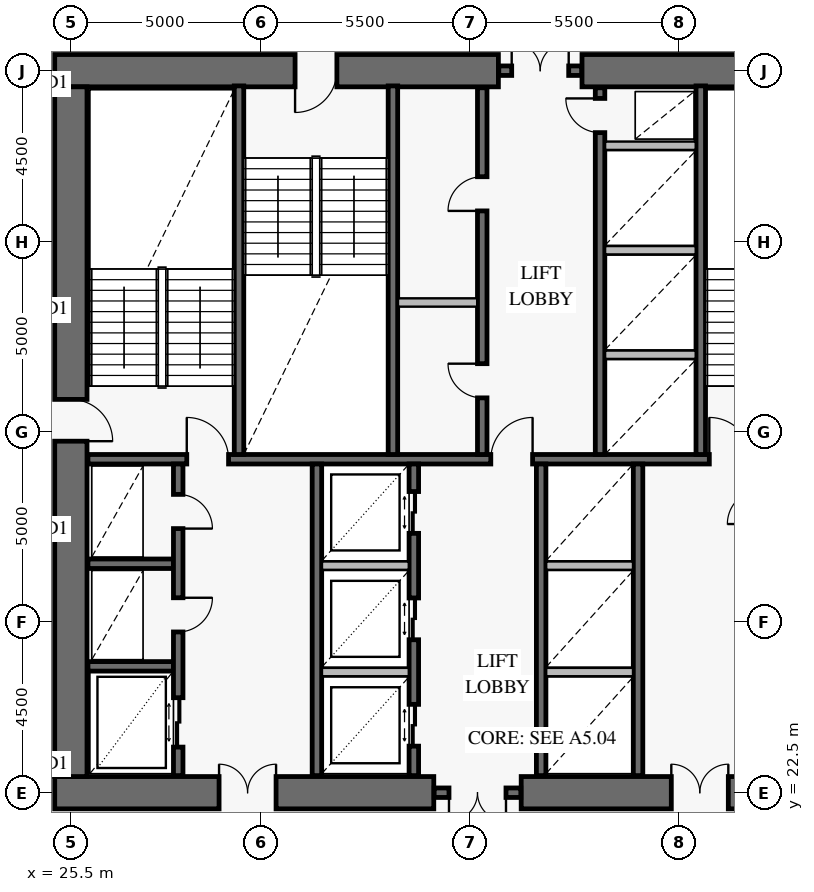
"""IFC4 building model, lengths in metres.
Left out: names, types, materials, properties, quantities, classifications, styles, units other than length and angle.
Written with IfcOpenShell. Run it as: python <this file> out.ifc"""

import sys

from ifc_helpers import new_model, si_unit, direction, frame, frame_2d, origin, place, context, subcontext, project, spatial, rectangle, extrude, element, fill, save


model = new_model("IFC4")
c1 = context("Model", 3, precision=1e-05, world=origin(), true_north=direction((0.0, 1.0)))
c2 = subcontext(c1, "Body", "Model", "MODEL_VIEW")
j1 = project(units=[si_unit("LENGTHUNIT", "METRE"), si_unit("PLANEANGLEUNIT", "RADIAN")], contexts=[c1])
p1 = place(None, origin())
s1 = spatial("IfcSite", under=j1, at=p1, CompositionType="ELEMENT")
p2 = place(p1, origin())
s2 = spatial("IfcBuilding", under=s1, at=p2, CompositionType="ELEMENT")
p3 = place(p2, frame((0.0, 0.0, 16.2)))
s3 = spatial("IfcBuildingStorey", under=s2, at=p3, CompositionType="ELEMENT", Elevation=16.2)
p4 = place(p3, frame((25.075, 22.5, 0.0), z_axis=(0.0, 0.0, 1.0), x_axis=(1.0, 0.0, 0.0)))
e1 = element("IfcWall", 1, at=p4, inside=s3, PredefinedType="SHEAR", context=c2, shape_type="SweptSolid", body=[
    extrude(rectangle(XDim=9.975, YDim=0.85, at=frame_2d((4.988, 0.0))), origin(), (0.0, 0.0, 1.0), 4.2),
])
p5 = place(p4, frame((4.325, 0.0, 0.0)))
e2 = element("IfcOpeningElement", 2, at=p5, cuts=e1, PredefinedType="OPENING", context=c2, shape_type="SweptSolid", body=[
    extrude(rectangle(XDim=1.5, YDim=2.15, at=frame_2d((0.75, 1.075))), frame((0.0, 0.437, 0.0), z_axis=(0.0, -1.0, 0.0), x_axis=(1.0, 0.0, 0.0)), (0.0, 0.0, 1.0), 0.874),
])
p6 = place(p3, frame((37.35, 22.5, 0.0), z_axis=(0.0, 0.0, 1.0), x_axis=(1.0, 0.0, 0.0)))
e3 = element("IfcWall", 3, at=p6, inside=s3, PredefinedType="SHEAR", context=c2, shape_type="SweptSolid", body=[
    extrude(rectangle(XDim=9.575, YDim=0.85, at=frame_2d((4.788, 0.0))), origin(), (0.0, 0.0, 1.0), 4.2),
])
p7 = place(p6, frame((3.95, 0.0, 0.0)))
e4 = element("IfcOpeningElement", 4, at=p7, cuts=e3, PredefinedType="OPENING", context=c2, shape_type="SweptSolid", body=[
    extrude(rectangle(XDim=1.5, YDim=2.15, at=frame_2d((0.75, 1.075))), frame((0.0, 0.437, 0.0), z_axis=(0.0, -1.0, 0.0), x_axis=(1.0, 0.0, 0.0)), (0.0, 0.0, 1.0), 0.874),
])
p8 = place(p3, frame((46.925, 41.5, 0.0), z_axis=(0.0, 0.0, 1.0), x_axis=(-1.0, 0.0, 0.0)))
e5 = element("IfcWall", 5, at=p8, inside=s3, PredefinedType="SHEAR", context=c2, shape_type="SweptSolid", body=[
    extrude(rectangle(XDim=7.975, YDim=0.85, at=frame_2d((3.988, 0.0))), origin(), (0.0, 0.0, 1.0), 4.2),
])
p9 = place(p3, frame((36.75, 41.5, 0.0), z_axis=(0.0, 0.0, 1.0), x_axis=(-1.0, 0.0, 0.0)))
e6 = element("IfcWall", 6, at=p9, inside=s3, PredefinedType="SHEAR", context=c2, shape_type="SweptSolid", body=[
    extrude(rectangle(XDim=11.675, YDim=0.85, at=frame_2d((5.837, 0.0))), origin(), (0.0, 0.0, 1.0), 4.2),
])
p10 = place(p9, frame((4.25, 0.0, 0.0)))
e7 = element("IfcOpeningElement", 7, at=p10, cuts=e6, PredefinedType="OPENING", context=c2, shape_type="SweptSolid", body=[
    extrude(rectangle(XDim=1.1, YDim=2.15, at=frame_2d((0.55, 1.075))), frame((0.0, 0.437, 0.0), z_axis=(0.0, -1.0, 0.0), x_axis=(1.0, 0.0, 0.0)), (0.0, 0.0, 1.0), 0.874),
])
p11 = place(p3, frame((25.5, 22.925, 0.0), z_axis=(0.0, 0.0, 1.0), x_axis=(0.0, 1.0, 0.0)))
e8 = element("IfcWall", 8, at=p11, inside=s3, PredefinedType="SHEAR", context=c2, shape_type="SweptSolid", body=[
    extrude(rectangle(XDim=18.15, YDim=0.85, at=frame_2d((9.075, 0.0))), origin(), (0.0, 0.0, 1.0), 4.2),
])
p12 = place(p11, frame((8.825, 0.0, 0.0)))
e9 = element("IfcOpeningElement", 9, at=p12, cuts=e8, PredefinedType="OPENING", context=c2, shape_type="SweptSolid", body=[
    extrude(rectangle(XDim=1.1, YDim=2.15, at=frame_2d((0.55, 1.075))), frame((0.0, 0.437, 0.0), z_axis=(0.0, -1.0, 0.0), x_axis=(1.0, 0.0, 0.0)), (0.0, 0.0, 1.0), 0.874),
])
p13 = place(p3, frame((35.06, 22.5, 0.0), z_axis=(0.0, 0.0, 1.0), x_axis=(1.0, 0.0, 0.0)))
e10 = element("IfcWall", 10, at=p13, inside=s3, PredefinedType="SOLIDWALL", context=c2, shape_type="SweptSolid", body=[
    extrude(rectangle(XDim=2.28, YDim=0.25, at=frame_2d((1.14, 0.0))), origin(), (0.0, 0.0, 1.0), 4.2),
])
p14 = place(p13, frame((0.39, 0.0, 0.0)))
e11 = element("IfcOpeningElement", 11, at=p14, cuts=e10, PredefinedType="OPENING", context=c2, shape_type="SweptSolid", body=[
    extrude(rectangle(XDim=1.5, YDim=2.15, at=frame_2d((0.75, 1.075))), frame((0.0, 0.137, 0.0), z_axis=(0.0, -1.0, 0.0), x_axis=(1.0, 0.0, 0.0)), (0.0, 0.0, 1.0), 0.274),
])
p15 = place(p3, frame((36.76, 41.5, 0.0), z_axis=(0.0, 0.0, 1.0), x_axis=(1.0, 0.0, 0.0)))
e12 = element("IfcWall", 12, at=p15, inside=s3, PredefinedType="SOLIDWALL", context=c2, shape_type="SweptSolid", body=[
    extrude(rectangle(XDim=2.18, YDim=0.25, at=frame_2d((1.09, 0.0))), origin(), (0.0, 0.0, 1.0), 4.2),
])
p16 = place(p15, frame((0.34, 0.0, 0.0)))
e13 = element("IfcOpeningElement", 13, at=p16, cuts=e12, PredefinedType="OPENING", context=c2, shape_type="SweptSolid", body=[
    extrude(rectangle(XDim=1.5, YDim=2.15, at=frame_2d((0.75, 1.075))), frame((0.0, 0.137, 0.0), z_axis=(0.0, -1.0, 0.0), x_axis=(1.0, 0.0, 0.0)), (0.0, 0.0, 1.0), 0.274),
])
p17 = place(p3, frame((25.95, 31.275, 0.0), z_axis=(0.0, 0.0, 1.0), x_axis=(1.0, 0.0, 0.0)))
e14 = element("IfcWall", 14, at=p17, inside=s3, PredefinedType="SOLIDWALL", context=c2, shape_type="SweptSolid", body=[
    extrude(rectangle(XDim=20.1, YDim=0.25, at=frame_2d((10.05, 0.0))), origin(), (0.0, 0.0, 1.0), 4.2),
])
p18 = place(p17, frame((2.6, 0.0, 0.0)))
e15 = element("IfcOpeningElement", 15, at=p18, cuts=e14, PredefinedType="OPENING", context=c2, shape_type="SweptSolid", body=[
    extrude(rectangle(XDim=1.1, YDim=2.15, at=frame_2d((0.55, 1.075))), frame((0.0, 0.137, 0.0), z_axis=(0.0, -1.0, 0.0), x_axis=(1.0, 0.0, 0.0)), (0.0, 0.0, 1.0), 0.274),
])
p19 = place(p17, frame((10.6, 0.0, 0.0)))
e16 = element("IfcOpeningElement", 16, at=p19, cuts=e14, PredefinedType="OPENING", context=c2, shape_type="SweptSolid", body=[
    extrude(rectangle(XDim=1.1, YDim=2.15, at=frame_2d((0.55, 1.075))), frame((0.0, 0.137, 0.0), z_axis=(0.0, -1.0, 0.0), x_axis=(1.0, 0.0, 0.0)), (0.0, 0.0, 1.0), 0.274),
])
p20 = place(p17, frame((16.35, 0.0, 0.0)))
e17 = element("IfcOpeningElement", 17, at=p20, cuts=e14, PredefinedType="OPENING", context=c2, shape_type="SweptSolid", body=[
    extrude(rectangle(XDim=1.1, YDim=2.15, at=frame_2d((0.55, 1.075))), frame((0.0, 0.137, 0.0), z_axis=(0.0, -1.0, 0.0), x_axis=(1.0, 0.0, 0.0)), (0.0, 0.0, 1.0), 0.274),
])
for number, where, z_axis, x_axis in (
    (18, (29.925, 31.4, 0.0), (0.0, 0.0, 1.0), (0.0, 1.0, 0.0)),
    (19, (33.975, 31.4, 0.0), (0.0, 0.0, 1.0), (0.0, 1.0, 0.0)),
    (20, (42.075, 31.4, 0.0), (0.0, 0.0, 1.0), (0.0, 1.0, 0.0)),
):
    element("IfcWall", number, at=place(p3, frame(where, z_axis=z_axis, x_axis=x_axis)), inside=s3, PredefinedType="SOLIDWALL", context=c2, shape_type="SweptSolid", body=[
        extrude(rectangle(XDim=9.7, YDim=0.25, at=frame_2d((4.85, 0.0))), origin(), (0.0, 0.0, 1.0), 4.2),
    ])
p21 = place(p3, frame((36.325, 31.4, 0.0), z_axis=(0.0, 0.0, 1.0), x_axis=(0.0, 1.0, 0.0)))
e21 = element("IfcWall", 21, at=p21, inside=s3, PredefinedType="SOLIDWALL", context=c2, shape_type="SweptSolid", body=[
    extrude(rectangle(XDim=9.65, YDim=0.25, at=frame_2d((4.825, 0.0))), origin(), (0.0, 0.0, 1.0), 4.2),
])
p22 = place(p21, frame((1.49, 0.0, 0.0)))
e22 = element("IfcOpeningElement", 22, at=p22, cuts=e21, PredefinedType="OPENING", context=c2, shape_type="SweptSolid", body=[
    extrude(rectangle(XDim=0.9, YDim=2.1, at=frame_2d((0.45, 1.05))), frame((0.0, 0.137, 0.0), z_axis=(0.0, -1.0, 0.0), x_axis=(1.0, 0.0, 0.0)), (0.0, 0.0, 1.0), 0.274),
])
p23 = place(p21, frame((6.41, 0.0, 0.0)))
e23 = element("IfcOpeningElement", 23, at=p23, cuts=e21, PredefinedType="OPENING", context=c2, shape_type="SweptSolid", body=[
    extrude(rectangle(XDim=0.9, YDim=2.1, at=frame_2d((0.45, 1.05))), frame((0.0, 0.137, 0.0), z_axis=(0.0, -1.0, 0.0), x_axis=(1.0, 0.0, 0.0)), (0.0, 0.0, 1.0), 0.274),
])
p24 = place(p3, frame((39.425, 31.4, 0.0), z_axis=(0.0, 0.0, 1.0), x_axis=(0.0, 1.0, 0.0)))
e24 = element("IfcWall", 24, at=p24, inside=s3, PredefinedType="SOLIDWALL", context=c2, shape_type="SweptSolid", body=[
    extrude(rectangle(XDim=9.65, YDim=0.25, at=frame_2d((4.825, 0.0))), origin(), (0.0, 0.0, 1.0), 4.2),
])
p25 = place(p24, frame((8.47, 0.0, 0.0)))
e25 = element("IfcOpeningElement", 25, at=p25, cuts=e24, PredefinedType="OPENING", context=c2, shape_type="SweptSolid", body=[
    extrude(rectangle(XDim=0.9, YDim=2.1, at=frame_2d((0.45, 1.05))), frame((0.0, 0.137, 0.0), z_axis=(0.0, -1.0, 0.0), x_axis=(1.0, 0.0, 0.0)), (0.0, 0.0, 1.0), 0.274),
])
for number, where, z_axis, x_axis in (
    (26, (25.95, 25.825, 0.0), (0.0, 0.0, 1.0), (1.0, 0.0, 0.0)),
    (27, (25.95, 28.525, 0.0), (0.0, 0.0, 1.0), (1.0, 0.0, 0.0)),
):
    element("IfcWall", number, at=place(p3, frame(where, z_axis=z_axis, x_axis=x_axis)), inside=s3, PredefinedType="SOLIDWALL", context=c2, shape_type="SweptSolid", body=[
        extrude(rectangle(XDim=2.25, YDim=0.25, at=frame_2d((1.125, 0.0))), origin(), (0.0, 0.0, 1.0), 4.2),
    ])
p26 = place(p3, frame((28.325, 22.95, 0.0), z_axis=(0.0, 0.0, 1.0), x_axis=(0.0, 1.0, 0.0)))
e28 = element("IfcWall", 28, at=p26, inside=s3, PredefinedType="SOLIDWALL", context=c2, shape_type="SweptSolid", body=[
    extrude(rectangle(XDim=8.2, YDim=0.25, at=frame_2d((4.1, 0.0))), origin(), (0.0, 0.0, 1.0), 4.2),
])
p27 = place(p26, frame((0.75, 0.0, 0.0)))
e29 = element("IfcOpeningElement", 29, at=p27, cuts=e28, PredefinedType="OPENING", context=c2, shape_type="SweptSolid", body=[
    extrude(rectangle(XDim=1.3, YDim=2.3, at=frame_2d((0.65, 1.15))), frame((0.0, 0.137, 0.0), z_axis=(0.0, -1.0, 0.0), x_axis=(1.0, 0.0, 0.0)), (0.0, 0.0, 1.0), 0.274),
])
p28 = place(p26, frame((3.78, 0.0, 0.0)))
e30 = element("IfcOpeningElement", 30, at=p28, cuts=e28, PredefinedType="OPENING", context=c2, shape_type="SweptSolid", body=[
    extrude(rectangle(XDim=0.9, YDim=2.1, at=frame_2d((0.45, 1.05))), frame((0.0, 0.137, 0.0), z_axis=(0.0, -1.0, 0.0), x_axis=(1.0, 0.0, 0.0)), (0.0, 0.0, 1.0), 0.274),
])
p29 = place(p26, frame((6.5, 0.0, 0.0)))
e31 = element("IfcOpeningElement", 31, at=p29, cuts=e28, PredefinedType="OPENING", context=c2, shape_type="SweptSolid", body=[
    extrude(rectangle(XDim=0.9, YDim=2.1, at=frame_2d((0.45, 1.05))), frame((0.0, 0.137, 0.0), z_axis=(0.0, -1.0, 0.0), x_axis=(1.0, 0.0, 0.0)), (0.0, 0.0, 1.0), 0.274),
])
p30 = place(p3, frame((31.975, 22.95, 0.0), z_axis=(0.0, 0.0, 1.0), x_axis=(0.0, 1.0, 0.0)))
e32 = element("IfcWall", 32, at=p30, inside=s3, PredefinedType="SOLIDWALL", context=c2, shape_type="SweptSolid", body=[
    extrude(rectangle(XDim=8.2, YDim=0.25, at=frame_2d((4.1, 0.0))), origin(), (0.0, 0.0, 1.0), 4.2),
])
p31 = place(p3, frame((34.525, 22.95, 0.0), z_axis=(0.0, 0.0, 1.0), x_axis=(0.0, 1.0, 0.0)))
e33 = element("IfcWall", 33, at=p31, inside=s3, PredefinedType="SOLIDWALL", context=c2, shape_type="SweptSolid", body=[
    extrude(rectangle(XDim=8.2, YDim=0.25, at=frame_2d((4.1, 0.0))), origin(), (0.0, 0.0, 1.0), 4.2),
])
p32 = place(p31, frame((0.775, 0.0, 0.0)))
e34 = element("IfcOpeningElement", 34, at=p32, cuts=e33, PredefinedType="OPENING", context=c2, shape_type="SweptSolid", body=[
    extrude(rectangle(XDim=1.1, YDim=2.2, at=frame_2d((0.55, 1.1))), frame((0.0, 0.137, 0.0), z_axis=(0.0, -1.0, 0.0), x_axis=(1.0, 0.0, 0.0)), (0.0, 0.0, 1.0), 0.274),
])
p33 = place(p31, frame((3.575, 0.0, 0.0)))
e35 = element("IfcOpeningElement", 35, at=p33, cuts=e33, PredefinedType="OPENING", context=c2, shape_type="SweptSolid", body=[
    extrude(rectangle(XDim=1.1, YDim=2.2, at=frame_2d((0.55, 1.1))), frame((0.0, 0.137, 0.0), z_axis=(0.0, -1.0, 0.0), x_axis=(1.0, 0.0, 0.0)), (0.0, 0.0, 1.0), 0.274),
])
p34 = place(p31, frame((6.375, 0.0, 0.0)))
e36 = element("IfcOpeningElement", 36, at=p34, cuts=e33, PredefinedType="OPENING", context=c2, shape_type="SweptSolid", body=[
    extrude(rectangle(XDim=1.1, YDim=2.2, at=frame_2d((0.55, 1.1))), frame((0.0, 0.137, 0.0), z_axis=(0.0, -1.0, 0.0), x_axis=(1.0, 0.0, 0.0)), (0.0, 0.0, 1.0), 0.274),
])
for number, where, z_axis, x_axis in (
    (37, (37.875, 22.95, 0.0), (0.0, 0.0, 1.0), (0.0, 1.0, 0.0)),
    (38, (40.425, 22.95, 0.0), (0.0, 0.0, 1.0), (0.0, 1.0, 0.0)),
):
    element("IfcWall", number, at=place(p3, frame(where, z_axis=z_axis, x_axis=x_axis)), inside=s3, PredefinedType="SOLIDWALL", context=c2, shape_type="SweptSolid", body=[
        extrude(rectangle(XDim=8.2, YDim=0.25, at=frame_2d((4.1, 0.0))), origin(), (0.0, 0.0, 1.0), 4.2),
    ])
p35 = place(p3, frame((34.108, 35.4, 0.0), z_axis=(0.0, 0.0, 1.0), x_axis=(1.0, 0.0, 0.0)))
e39 = element("IfcWall", 39, at=p35, inside=s3, PredefinedType="PARTITIONING", context=c2, shape_type="SweptSolid", body=[
    extrude(rectangle(XDim=2.084, YDim=0.22, at=frame_2d((1.042, 0.0))), origin(), (0.0, 0.0, 1.0), 3.92),
])
for number, where, z_axis, x_axis in (
    (40, (39.558, 34.025, 0.0), (0.0, 0.0, 1.0), (1.0, 0.0, 0.0)),
    (41, (39.558, 36.775, 0.0), (0.0, 0.0, 1.0), (1.0, 0.0, 0.0)),
    (42, (39.558, 39.525, 0.0), (0.0, 0.0, 1.0), (1.0, 0.0, 0.0)),
):
    element("IfcWall", number, at=place(p3, frame(where, z_axis=z_axis, x_axis=x_axis)), inside=s3, PredefinedType="PARTITIONING", context=c2, shape_type="SweptSolid", body=[
        extrude(rectangle(XDim=2.384, YDim=0.22, at=frame_2d((1.192, 0.0))), origin(), (0.0, 0.0, 1.0), 3.92),
    ])
for number, where, z_axis, x_axis in (
    (43, (32.108, 25.675, 0.0), (0.0, 0.0, 1.0), (1.0, 0.0, 0.0)),
    (44, (32.108, 28.475, 0.0), (0.0, 0.0, 1.0), (1.0, 0.0, 0.0)),
):
    element("IfcWall", number, at=place(p3, frame(where, z_axis=z_axis, x_axis=x_axis)), inside=s3, PredefinedType="PARTITIONING", context=c2, shape_type="SweptSolid", body=[
        extrude(rectangle(XDim=2.284, YDim=0.22, at=frame_2d((1.142, 0.0))), origin(), (0.0, 0.0, 1.0), 3.92),
    ])
for number, where, z_axis, x_axis in (
    (45, (38.008, 25.675, 0.0), (0.0, 0.0, 1.0), (1.0, 0.0, 0.0)),
    (46, (38.008, 28.475, 0.0), (0.0, 0.0, 1.0), (1.0, 0.0, 0.0)),
):
    element("IfcWall", number, at=place(p3, frame(where, z_axis=z_axis, x_axis=x_axis)), inside=s3, PredefinedType="PARTITIONING", context=c2, shape_type="SweptSolid", body=[
        extrude(rectangle(XDim=2.284, YDim=0.22, at=frame_2d((1.142, 0.0))), origin(), (0.0, 0.0, 1.0), 3.92),
    ])
p36 = place(p12, frame((1.1, 0.0, 0.0), z_axis=(0.0, 0.0, 1.0), x_axis=(-1.0, 0.0, 0.0)))
e47 = element("IfcDoor", 47, at=p36, inside=s3, OperationType="SINGLE_SWING_RIGHT", PredefinedType="USERDEFINED", context=c2, shape_type="SweptSolid", body=[
    extrude(rectangle(XDim=1.1, YDim=2.15, at=frame_2d((0.55, 1.075))), frame((0.0, 0.025, 0.0), z_axis=(0.0, -1.0, 0.0), x_axis=(1.0, 0.0, 0.0)), (0.0, 0.0, 1.0), 0.05),
])
fill(e9, e47)
p37 = place(p10, origin())
e48 = element("IfcDoor", 48, at=p37, inside=s3, OperationType="SINGLE_SWING_RIGHT", PredefinedType="USERDEFINED", context=c2, shape_type="SweptSolid", body=[
    extrude(rectangle(XDim=1.1, YDim=2.15, at=frame_2d((0.55, 1.075))), frame((0.0, 0.025, 0.0), z_axis=(0.0, -1.0, 0.0), x_axis=(1.0, 0.0, 0.0)), (0.0, 0.0, 1.0), 0.05),
])
fill(e7, e48)
p38 = place(p5, origin())
e49 = element("IfcDoor", 49, at=p38, inside=s3, OperationType="DOUBLE_DOOR_SINGLE_SWING", PredefinedType="DOOR", context=c2, shape_type="SweptSolid", body=[
    extrude(rectangle(XDim=1.5, YDim=2.15, at=frame_2d((0.75, 1.075))), frame((0.0, 0.025, 0.0), z_axis=(0.0, -1.0, 0.0), x_axis=(1.0, 0.0, 0.0)), (0.0, 0.0, 1.0), 0.05),
])
fill(e2, e49)
p39 = place(p7, origin())
e50 = element("IfcDoor", 50, at=p39, inside=s3, OperationType="DOUBLE_DOOR_SINGLE_SWING", PredefinedType="DOOR", context=c2, shape_type="SweptSolid", body=[
    extrude(rectangle(XDim=1.5, YDim=2.15, at=frame_2d((0.75, 1.075))), frame((0.0, 0.025, 0.0), z_axis=(0.0, -1.0, 0.0), x_axis=(1.0, 0.0, 0.0)), (0.0, 0.0, 1.0), 0.05),
])
fill(e4, e50)
p40 = place(p14, frame((1.5, 0.0, 0.0), z_axis=(0.0, 0.0, 1.0), x_axis=(-1.0, 0.0, 0.0)))
e51 = element("IfcDoor", 51, at=p40, inside=s3, OperationType="DOUBLE_DOOR_SINGLE_SWING", PredefinedType="DOOR", context=c2, shape_type="SweptSolid", body=[
    extrude(rectangle(XDim=1.5, YDim=2.15, at=frame_2d((0.75, 1.075))), frame((0.0, 0.025, 0.0), z_axis=(0.0, -1.0, 0.0), x_axis=(1.0, 0.0, 0.0)), (0.0, 0.0, 1.0), 0.05),
])
fill(e11, e51)
p41 = place(p16, origin())
e52 = element("IfcDoor", 52, at=p41, inside=s3, OperationType="DOUBLE_DOOR_SINGLE_SWING", PredefinedType="DOOR", context=c2, shape_type="SweptSolid", body=[
    extrude(rectangle(XDim=1.5, YDim=2.15, at=frame_2d((0.75, 1.075))), frame((0.0, 0.025, 0.0), z_axis=(0.0, -1.0, 0.0), x_axis=(1.0, 0.0, 0.0)), (0.0, 0.0, 1.0), 0.05),
])
fill(e13, e52)
p42 = place(p18, origin())
e53 = element("IfcDoor", 53, at=p42, inside=s3, OperationType="SINGLE_SWING_LEFT", PredefinedType="USERDEFINED", context=c2, shape_type="SweptSolid", body=[
    extrude(rectangle(XDim=1.1, YDim=2.15, at=frame_2d((0.55, 1.075))), frame((0.0, 0.025, 0.0), z_axis=(0.0, -1.0, 0.0), x_axis=(1.0, 0.0, 0.0)), (0.0, 0.0, 1.0), 0.05),
])
fill(e15, e53)
p43 = place(p19, origin())
e54 = element("IfcDoor", 54, at=p43, inside=s3, OperationType="SINGLE_SWING_RIGHT", PredefinedType="USERDEFINED", context=c2, shape_type="SweptSolid", body=[
    extrude(rectangle(XDim=1.1, YDim=2.15, at=frame_2d((0.55, 1.075))), frame((0.0, 0.025, 0.0), z_axis=(0.0, -1.0, 0.0), x_axis=(1.0, 0.0, 0.0)), (0.0, 0.0, 1.0), 0.05),
])
fill(e16, e54)
p44 = place(p20, origin())
e55 = element("IfcDoor", 55, at=p44, inside=s3, OperationType="SINGLE_SWING_LEFT", PredefinedType="USERDEFINED", context=c2, shape_type="SweptSolid", body=[
    extrude(rectangle(XDim=1.1, YDim=2.15, at=frame_2d((0.55, 1.075))), frame((0.0, 0.025, 0.0), z_axis=(0.0, -1.0, 0.0), x_axis=(1.0, 0.0, 0.0)), (0.0, 0.0, 1.0), 0.05),
])
fill(e17, e55)
p45 = place(p22, origin())
e56 = element("IfcDoor", 56, at=p45, inside=s3, OperationType="SINGLE_SWING_RIGHT", PredefinedType="DOOR", context=c2, shape_type="SweptSolid", body=[
    extrude(rectangle(XDim=0.9, YDim=2.1, at=frame_2d((0.45, 1.05))), frame((0.0, 0.025, 0.0), z_axis=(0.0, -1.0, 0.0), x_axis=(1.0, 0.0, 0.0)), (0.0, 0.0, 1.0), 0.05),
])
fill(e22, e56)
p46 = place(p23, origin())
e57 = element("IfcDoor", 57, at=p46, inside=s3, OperationType="SINGLE_SWING_LEFT", PredefinedType="DOOR", context=c2, shape_type="SweptSolid", body=[
    extrude(rectangle(XDim=0.9, YDim=2.1, at=frame_2d((0.45, 1.05))), frame((0.0, 0.025, 0.0), z_axis=(0.0, -1.0, 0.0), x_axis=(1.0, 0.0, 0.0)), (0.0, 0.0, 1.0), 0.05),
])
fill(e23, e57)
p47 = place(p25, origin())
e58 = element("IfcDoor", 58, at=p47, inside=s3, OperationType="SINGLE_SWING_RIGHT", PredefinedType="DOOR", context=c2, shape_type="SweptSolid", body=[
    extrude(rectangle(XDim=0.9, YDim=2.1, at=frame_2d((0.45, 1.05))), frame((0.0, 0.025, 0.0), z_axis=(0.0, -1.0, 0.0), x_axis=(1.0, 0.0, 0.0)), (0.0, 0.0, 1.0), 0.05),
])
fill(e25, e58)
p48 = place(p27, frame((1.3, 0.0, 0.0), z_axis=(0.0, 0.0, 1.0), x_axis=(-1.0, 0.0, 0.0)))
e59 = element("IfcDoor", 59, at=p48, inside=s3, OperationType="DOUBLE_DOOR_SLIDING", PredefinedType="DOOR", context=c2, shape_type="SweptSolid", body=[
    extrude(rectangle(XDim=1.3, YDim=2.3, at=frame_2d((0.65, 1.15))), frame((0.0, 0.025, 0.0), z_axis=(0.0, -1.0, 0.0), x_axis=(1.0, 0.0, 0.0)), (0.0, 0.0, 1.0), 0.05),
])
fill(e29, e59)
p49 = place(p28, frame((0.9, 0.0, 0.0), z_axis=(0.0, 0.0, 1.0), x_axis=(-1.0, 0.0, 0.0)))
e60 = element("IfcDoor", 60, at=p49, inside=s3, OperationType="SINGLE_SWING_LEFT", PredefinedType="DOOR", context=c2, shape_type="SweptSolid", body=[
    extrude(rectangle(XDim=0.9, YDim=2.1, at=frame_2d((0.45, 1.05))), frame((0.0, 0.025, 0.0), z_axis=(0.0, -1.0, 0.0), x_axis=(1.0, 0.0, 0.0)), (0.0, 0.0, 1.0), 0.05),
])
fill(e30, e60)
p50 = place(p29, frame((0.9, 0.0, 0.0), z_axis=(0.0, 0.0, 1.0), x_axis=(-1.0, 0.0, 0.0)))
e61 = element("IfcDoor", 61, at=p50, inside=s3, OperationType="SINGLE_SWING_RIGHT", PredefinedType="DOOR", context=c2, shape_type="SweptSolid", body=[
    extrude(rectangle(XDim=0.9, YDim=2.1, at=frame_2d((0.45, 1.05))), frame((0.0, 0.025, 0.0), z_axis=(0.0, -1.0, 0.0), x_axis=(1.0, 0.0, 0.0)), (0.0, 0.0, 1.0), 0.05),
])
fill(e31, e61)
p51 = place(p32, frame((1.1, 0.0, 0.0), z_axis=(0.0, 0.0, 1.0), x_axis=(-1.0, 0.0, 0.0)))
e62 = element("IfcDoor", 62, at=p51, inside=s3, OperationType="DOUBLE_DOOR_SLIDING", PredefinedType="DOOR", context=c2, shape_type="SweptSolid", body=[
    extrude(rectangle(XDim=1.1, YDim=2.2, at=frame_2d((0.55, 1.1))), frame((0.0, 0.025, 0.0), z_axis=(0.0, -1.0, 0.0), x_axis=(1.0, 0.0, 0.0)), (0.0, 0.0, 1.0), 0.05),
])
fill(e34, e62)
p52 = place(p33, frame((1.1, 0.0, 0.0), z_axis=(0.0, 0.0, 1.0), x_axis=(-1.0, 0.0, 0.0)))
e63 = element("IfcDoor", 63, at=p52, inside=s3, OperationType="DOUBLE_DOOR_SLIDING", PredefinedType="DOOR", context=c2, shape_type="SweptSolid", body=[
    extrude(rectangle(XDim=1.1, YDim=2.2, at=frame_2d((0.55, 1.1))), frame((0.0, 0.025, 0.0), z_axis=(0.0, -1.0, 0.0), x_axis=(1.0, 0.0, 0.0)), (0.0, 0.0, 1.0), 0.05),
])
fill(e35, e63)
p53 = place(p34, frame((1.1, 0.0, 0.0), z_axis=(0.0, 0.0, 1.0), x_axis=(-1.0, 0.0, 0.0)))
e64 = element("IfcDoor", 64, at=p53, inside=s3, OperationType="DOUBLE_DOOR_SLIDING", PredefinedType="DOOR", context=c2, shape_type="SweptSolid", body=[
    extrude(rectangle(XDim=1.1, YDim=2.2, at=frame_2d((0.55, 1.1))), frame((0.0, 0.025, 0.0), z_axis=(0.0, -1.0, 0.0), x_axis=(1.0, 0.0, 0.0)), (0.0, 0.0, 1.0), 0.05),
])
fill(e36, e64)
save(model, sys.argv[1])
